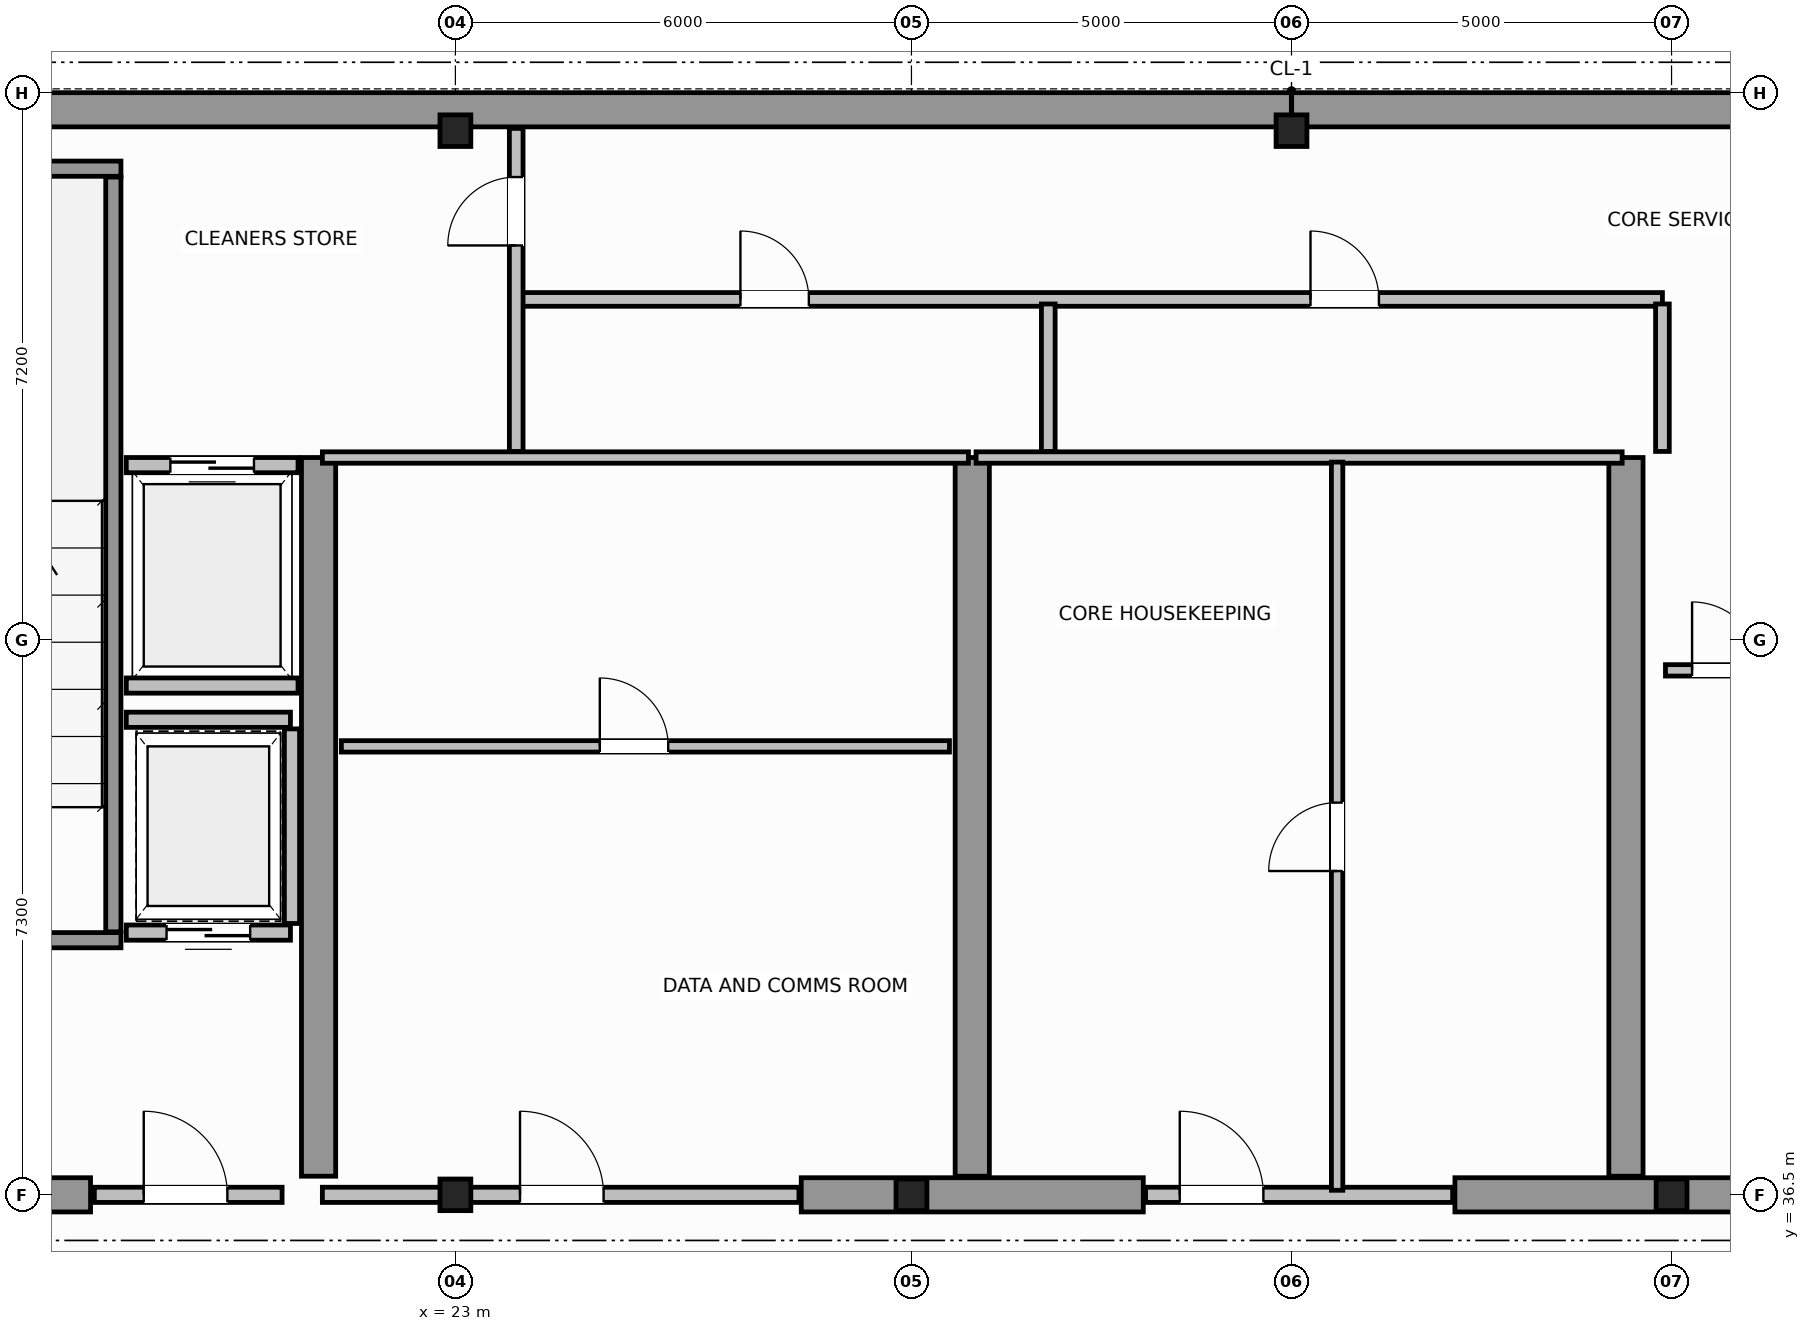
"""IFC4 building model, lengths in metres.
Left out: names, types, materials, properties, quantities, classifications, styles, units other than length and angle.
Written with IfcOpenShell. Run it as: python <this file> out.ifc"""

import sys

from ifc_helpers import new_model, si_unit, direction, frame, frame_2d, origin, origin_2d, place, context, subcontext, project, spatial, rectangle, i_section, extrude, source, transform, mapped, element, fill, save


model = new_model("IFC4")
c1 = context("Model", 3, precision=1e-05, world=origin(), true_north=direction((0.0, 1.0)))
c2 = subcontext(c1, "Body", "Model", "MODEL_VIEW")
j1 = project(units=[si_unit("LENGTHUNIT", "METRE"), si_unit("PLANEANGLEUNIT", "RADIAN")], contexts=[c1])
p1 = place(None, origin())
s1 = spatial("IfcSite", under=j1, at=p1, CompositionType="ELEMENT")
p2 = place(p1, origin())
s2 = spatial("IfcBuilding", under=s1, at=p2, CompositionType="ELEMENT")
p3 = place(p2, frame((0.0, 0.0, 308.4)))
s3 = spatial("IfcBuildingStorey", under=s2, at=p3, CompositionType="ELEMENT", Elevation=308.4)
m1 = source(origin(), c2, "Body", "SweptSolid", [
    extrude(i_section(OverallWidth=0.406, OverallDepth=0.416, WebThickness=0.03, FlangeThickness=0.042, FilletRadius=0.015, at=origin_2d()), origin(), (0.0, 0.0, 1.0), 4.4),
])
for number, where, z_axis, x_axis in (
    (1, (23.0, 36.5, 0.0), (0.0, 0.0, 1.0), (1.0, 0.0, 0.0)),
    (2, (29.0, 36.5, 0.0), (0.0, 0.0, 1.0), (1.0, 0.0, 0.0)),
    (3, (39.0, 36.5, 0.0), (0.0, 0.0, 1.0), (1.0, 0.0, 0.0)),
    (4, (23.0, 50.5, 0.0), (0.0, 0.0, 1.0), (1.0, 0.0, 0.0)),
    (5, (34.0, 50.5, 0.0), (0.0, 0.0, 1.0), (1.0, 0.0, 0.0)),
):
    element("IfcColumn", number, at=place(p3, frame(where, z_axis=z_axis, x_axis=x_axis)), inside=s3, PredefinedType="COLUMN", context=c2, shape_type="MappedRepresentation", body=[
        mapped(m1, transform((0.0, 0.0, 0.0), scale=1.0)),
    ])
for number, where, z_axis, x_axis in (
    (6, (14.229, 50.775, 0.0), (0.0, 0.0, 1.0), (1.0, 0.0, 0.0)),
    (7, (34.002, 50.775, 0.0), (0.0, 0.0, 1.0), (1.0, 0.0, 0.0)),
):
    element("IfcWall", number, at=place(p3, frame(where, z_axis=z_axis, x_axis=x_axis)), inside=s3, PredefinedType="SHEAR", context=c2, shape_type="SweptSolid", body=[
        extrude(rectangle(XDim=19.769, YDim=0.45, at=frame_2d((9.885, 0.0))), origin(), (0.0, 0.0, 1.0), 4.4),
    ])
p4 = place(p3, frame((14.245, 36.5, 0.0), z_axis=(0.0, 0.0, 1.0), x_axis=(1.0, 0.0, 0.0)))
e8 = element("IfcWall", 8, at=p4, inside=s3, PredefinedType="SHEAR", context=c2, shape_type="SweptSolid", body=[
    extrude(rectangle(XDim=3.955, YDim=0.45, at=frame_2d((1.978, 0.0))), origin(), (0.0, 0.0, 1.0), 3.1),
])
for number, where, z_axis, x_axis in (
    (9, (27.55, 36.5, 0.0), (0.0, 0.0, 1.0), (1.0, 0.0, 0.0)),
    (10, (36.15, 36.5, 0.0), (0.0, 0.0, 1.0), (1.0, 0.0, 0.0)),
):
    element("IfcWall", number, at=place(p3, frame(where, z_axis=z_axis, x_axis=x_axis)), inside=s3, PredefinedType="SHEAR", context=c2, shape_type="SweptSolid", body=[
        extrude(rectangle(XDim=4.5, YDim=0.45, at=frame_2d((2.25, 0.0))), origin(), (0.0, 0.0, 1.0), 4.4),
    ])
for number, where, z_axis, x_axis in (
    (11, (21.2, 36.745, 0.0), (0.0, 0.0, 1.0), (0.0, 1.0, 0.0)),
    (12, (29.8, 36.745, 0.0), (0.0, 0.0, 1.0), (0.0, 1.0, 0.0)),
    (13, (38.4, 36.745, 0.0), (0.0, 0.0, 1.0), (0.0, 1.0, 0.0)),
):
    element("IfcWall", number, at=place(p3, frame(where, z_axis=z_axis, x_axis=x_axis)), inside=s3, PredefinedType="SHEAR", context=c2, shape_type="SweptSolid", body=[
        extrude(rectangle(XDim=9.455, YDim=0.45, at=frame_2d((4.728, 0.0))), origin(), (0.0, 0.0, 1.0), 4.4),
    ])
p5 = place(p3, frame((14.225, 39.85, 0.0), z_axis=(0.0, 0.0, 1.0), x_axis=(1.0, 0.0, 0.0)))
e14 = element("IfcWall", 14, at=p5, inside=s3, PredefinedType="SOLIDWALL", context=c2, shape_type="SweptSolid", body=[
    extrude(rectangle(XDim=4.375, YDim=0.2, at=frame_2d((2.188, 0.0))), origin(), (0.0, 0.0, 1.0), 4.4),
])
p6 = place(p5, frame((1.95, 0.0, 0.0)))
e15 = element("IfcOpeningElement", 15, at=p6, cuts=e14, PredefinedType="OPENING", context=c2, shape_type="SweptSolid", body=[
    extrude(rectangle(XDim=1.1, YDim=2.15, at=frame_2d((0.55, 1.075))), frame((0.0, 0.11, 0.0), z_axis=(0.0, -1.0, 0.0), x_axis=(1.0, 0.0, 0.0)), (0.0, 0.0, 1.0), 0.22),
])
p7 = place(p3, frame((14.225, 50.0, 0.0), z_axis=(0.0, 0.0, 1.0), x_axis=(1.0, 0.0, 0.0)))
e16 = element("IfcWall", 16, at=p7, inside=s3, PredefinedType="SOLIDWALL", context=c2, shape_type="SweptSolid", body=[
    extrude(rectangle(XDim=4.375, YDim=0.2, at=frame_2d((2.188, 0.0))), origin(), (0.0, 0.0, 1.0), 4.4),
])
p8 = place(p3, frame((18.5, 39.96, 0.0), z_axis=(0.0, 0.0, 1.0), x_axis=(0.0, 1.0, 0.0)))
e17 = element("IfcWall", 17, at=p8, inside=s3, PredefinedType="SOLIDWALL", context=c2, shape_type="SweptSolid", body=[
    extrude(rectangle(XDim=9.93, YDim=0.2, at=frame_2d((4.965, 0.0))), origin(), (0.0, 0.0, 1.0), 4.4),
])
p9 = place(p3, frame((18.25, 36.5, 0.0), z_axis=(0.0, 0.0, 1.0), x_axis=(1.0, 0.0, 0.0)))
e18 = element("IfcWall", 18, at=p9, inside=s3, PredefinedType="SOLIDWALL", context=c2, shape_type="SweptSolid", body=[
    extrude(rectangle(XDim=2.47, YDim=0.2, at=frame_2d((1.235, 0.0))), origin(), (0.0, 0.0, 1.0), 3.09),
])
p10 = place(p9, frame((0.65, 0.0, 0.0)))
e19 = element("IfcOpeningElement", 19, at=p10, cuts=e18, PredefinedType="OPENING", context=c2, shape_type="SweptSolid", body=[
    extrude(rectangle(XDim=1.1, YDim=2.15, at=frame_2d((0.55, 1.075))), frame((0.0, 0.11, 0.0), z_axis=(0.0, -1.0, 0.0), x_axis=(1.0, 0.0, 0.0)), (0.0, 0.0, 1.0), 0.22),
])
p11 = place(p3, frame((18.67, 46.1, 0.0), z_axis=(0.0, 0.0, 1.0), x_axis=(1.0, 0.0, 0.0)))
e20 = element("IfcWall", 20, at=p11, inside=s3, PredefinedType="SOLIDWALL", context=c2, shape_type="SweptSolid", body=[
    extrude(rectangle(XDim=2.26, YDim=0.2, at=frame_2d((1.13, 0.0))), origin(), (0.0, 0.0, 1.0), 4.1),
])
p12 = place(p11, frame((0.58, 0.0, 0.0)))
e21 = element("IfcOpeningElement", 21, at=p12, cuts=e20, PredefinedType="OPENING", context=c2, shape_type="SweptSolid", body=[
    extrude(rectangle(XDim=1.1, YDim=2.15, at=frame_2d((0.55, 1.075))), frame((0.0, 0.11, 0.0), z_axis=(0.0, -1.0, 0.0), x_axis=(1.0, 0.0, 0.0)), (0.0, 0.0, 1.0), 0.22),
])
p13 = place(p3, frame((18.67, 43.2, 0.0), z_axis=(0.0, 0.0, 1.0), x_axis=(1.0, 0.0, 0.0)))
e22 = element("IfcWall", 22, at=p13, inside=s3, PredefinedType="SOLIDWALL", context=c2, shape_type="SweptSolid", body=[
    extrude(rectangle(XDim=2.26, YDim=0.2, at=frame_2d((1.13, 0.0))), origin(), (0.0, 0.0, 1.0), 4.1),
])
p14 = place(p3, frame((18.67, 39.95, 0.0), z_axis=(0.0, 0.0, 1.0), x_axis=(1.0, 0.0, 0.0)))
e23 = element("IfcWall", 23, at=p14, inside=s3, PredefinedType="SOLIDWALL", context=c2, shape_type="SweptSolid", body=[
    extrude(rectangle(XDim=2.16, YDim=0.2, at=frame_2d((1.08, 0.0))), origin(), (0.0, 0.0, 1.0), 4.1),
])
p15 = place(p14, frame((0.53, 0.0, 0.0)))
e24 = element("IfcOpeningElement", 24, at=p15, cuts=e23, PredefinedType="OPENING", context=c2, shape_type="SweptSolid", body=[
    extrude(rectangle(XDim=1.1, YDim=2.15, at=frame_2d((0.55, 1.075))), frame((0.0, 0.11, 0.0), z_axis=(0.0, -1.0, 0.0), x_axis=(1.0, 0.0, 0.0)), (0.0, 0.0, 1.0), 0.22),
])
p16 = place(p3, frame((18.67, 42.75, 0.0), z_axis=(0.0, 0.0, 1.0), x_axis=(1.0, 0.0, 0.0)))
e25 = element("IfcWall", 25, at=p16, inside=s3, PredefinedType="SOLIDWALL", context=c2, shape_type="SweptSolid", body=[
    extrude(rectangle(XDim=2.16, YDim=0.2, at=frame_2d((1.08, 0.0))), origin(), (0.0, 0.0, 1.0), 4.1),
])
p17 = place(p3, frame((20.85, 40.07, 0.0), z_axis=(0.0, 0.0, 1.0), x_axis=(0.0, 1.0, 0.0)))
e26 = element("IfcWall", 26, at=p17, inside=s3, PredefinedType="SOLIDWALL", context=c2, shape_type="SweptSolid", body=[
    extrude(rectangle(XDim=2.56, YDim=0.2, at=frame_2d((1.28, 0.0))), origin(), (0.0, 0.0, 1.0), 4.1),
])
p18 = place(p3, frame((21.25, 36.5, 0.0), z_axis=(0.0, 0.0, 1.0), x_axis=(1.0, 0.0, 0.0)))
e27 = element("IfcWall", 27, at=p18, inside=s3, PredefinedType="SOLIDWALL", context=c2, shape_type="SweptSolid", body=[
    extrude(rectangle(XDim=6.27, YDim=0.2, at=frame_2d((3.135, 0.0))), origin(), (0.0, 0.0, 1.0), 2.89),
])
p19 = place(p18, frame((2.6, 0.0, 0.0)))
e28 = element("IfcOpeningElement", 28, at=p19, cuts=e27, PredefinedType="OPENING", context=c2, shape_type="SweptSolid", body=[
    extrude(rectangle(XDim=1.1, YDim=2.15, at=frame_2d((0.55, 1.075))), frame((0.0, 0.11, 0.0), z_axis=(0.0, -1.0, 0.0), x_axis=(1.0, 0.0, 0.0)), (0.0, 0.0, 1.0), 0.22),
])
p20 = place(p3, frame((21.25, 46.2, 0.0), z_axis=(0.0, 0.0, 1.0), x_axis=(1.0, 0.0, 0.0)))
e29 = element("IfcWall", 29, at=p20, inside=s3, PredefinedType="PARTITIONING", context=c2, shape_type="SweptSolid", body=[
    extrude(rectangle(XDim=8.5, YDim=0.15, at=frame_2d((4.25, 0.0))), origin(), (0.0, 0.0, 1.0), 4.1),
])
p21 = place(p3, frame((21.5, 42.4, 0.0), z_axis=(0.0, 0.0, 1.0), x_axis=(1.0, 0.0, 0.0)))
e30 = element("IfcWall", 30, at=p21, inside=s3, PredefinedType="PARTITIONING", context=c2, shape_type="SweptSolid", body=[
    extrude(rectangle(XDim=8.0, YDim=0.15, at=frame_2d((4.0, 0.0))), origin(), (0.0, 0.0, 1.0), 4.1),
])
p22 = place(p21, frame((3.4, 0.0, 0.0)))
e31 = element("IfcOpeningElement", 31, at=p22, cuts=e30, PredefinedType="OPENING", context=c2, shape_type="SweptSolid", body=[
    extrude(rectangle(XDim=0.9, YDim=2.1, at=frame_2d((0.45, 1.05))), frame((0.0, 0.085, 0.0), z_axis=(0.0, -1.0, 0.0), x_axis=(1.0, 0.0, 0.0)), (0.0, 0.0, 1.0), 0.17),
])
p23 = place(p3, frame((32.08, 36.5, 0.0), z_axis=(0.0, 0.0, 1.0), x_axis=(1.0, 0.0, 0.0)))
e32 = element("IfcWall", 32, at=p23, inside=s3, PredefinedType="SOLIDWALL", context=c2, shape_type="SweptSolid", body=[
    extrude(rectangle(XDim=4.04, YDim=0.2, at=frame_2d((2.02, 0.0))), origin(), (0.0, 0.0, 1.0), 2.89),
])
p24 = place(p23, frame((0.45, 0.0, 0.0)))
e33 = element("IfcOpeningElement", 33, at=p24, cuts=e32, PredefinedType="OPENING", context=c2, shape_type="SweptSolid", body=[
    extrude(rectangle(XDim=1.1, YDim=2.15, at=frame_2d((0.55, 1.075))), frame((0.0, 0.11, 0.0), z_axis=(0.0, -1.0, 0.0), x_axis=(1.0, 0.0, 0.0)), (0.0, 0.0, 1.0), 0.22),
])
p25 = place(p3, frame((29.85, 46.2, 0.0), z_axis=(0.0, 0.0, 1.0), x_axis=(1.0, 0.0, 0.0)))
e34 = element("IfcWall", 34, at=p25, inside=s3, PredefinedType="PARTITIONING", context=c2, shape_type="SweptSolid", body=[
    extrude(rectangle(XDim=8.5, YDim=0.15, at=frame_2d((4.25, 0.0))), origin(), (0.0, 0.0, 1.0), 4.1),
])
p26 = place(p3, frame((34.6, 36.56, 0.0), z_axis=(0.0, 0.0, 1.0), x_axis=(0.0, 1.0, 0.0)))
e35 = element("IfcWall", 35, at=p26, inside=s3, PredefinedType="PARTITIONING", context=c2, shape_type="SweptSolid", body=[
    extrude(rectangle(XDim=9.58, YDim=0.15, at=frame_2d((4.79, 0.0))), origin(), (0.0, 0.0, 1.0), 4.1),
])
p27 = place(p26, frame((4.2, 0.0, 0.0)))
e36 = element("IfcOpeningElement", 36, at=p27, cuts=e35, PredefinedType="OPENING", context=c2, shape_type="SweptSolid", body=[
    extrude(rectangle(XDim=0.9, YDim=2.1, at=frame_2d((0.45, 1.05))), frame((0.0, 0.085, 0.0), z_axis=(0.0, -1.0, 0.0), x_axis=(1.0, 0.0, 0.0)), (0.0, 0.0, 1.0), 0.17),
])
p28 = place(p3, frame((38.92, 43.4, 0.0), z_axis=(0.0, 0.0, 1.0), x_axis=(1.0, 0.0, 0.0)))
e37 = element("IfcWall", 37, at=p28, inside=s3, PredefinedType="PARTITIONING", context=c2, shape_type="SweptSolid", body=[
    extrude(rectangle(XDim=1.6, YDim=0.15, at=frame_2d((0.8, 0.0))), origin(), (0.0, 0.0, 1.0), 4.1),
])
p29 = place(p28, frame((0.35, 0.0, 0.0)))
e38 = element("IfcOpeningElement", 38, at=p29, cuts=e37, PredefinedType="OPENING", context=c2, shape_type="SweptSolid", body=[
    extrude(rectangle(XDim=0.9, YDim=2.1, at=frame_2d((0.45, 1.05))), frame((0.0, 0.085, 0.0), z_axis=(0.0, -1.0, 0.0), x_axis=(1.0, 0.0, 0.0)), (0.0, 0.0, 1.0), 0.17),
])
p30 = place(p3, frame((23.85, 48.28, 0.0), z_axis=(0.0, 0.0, 1.0), x_axis=(1.0, 0.0, 0.0)))
e39 = element("IfcWall", 39, at=p30, inside=s3, PredefinedType="PLUMBINGWALL", context=c2, shape_type="SweptSolid", body=[
    extrude(rectangle(XDim=15.03, YDim=0.18, at=frame_2d((7.515, 0.0))), origin(), (0.0, 0.0, 1.0), 4.1),
])
p31 = place(p30, frame((2.9, 0.0, 0.0)))
e40 = element("IfcOpeningElement", 40, at=p31, cuts=e39, PredefinedType="OPENING", context=c2, shape_type="SweptSolid", body=[
    extrude(rectangle(XDim=0.9, YDim=2.15, at=frame_2d((0.45, 1.075))), frame((0.0, 0.1, 0.0), z_axis=(0.0, -1.0, 0.0), x_axis=(1.0, 0.0, 0.0)), (0.0, 0.0, 1.0), 0.2),
])
p32 = place(p30, frame((10.4, 0.0, 0.0)))
e41 = element("IfcOpeningElement", 41, at=p32, cuts=e39, PredefinedType="OPENING", context=c2, shape_type="SweptSolid", body=[
    extrude(rectangle(XDim=0.9, YDim=2.15, at=frame_2d((0.45, 1.075))), frame((0.0, 0.1, 0.0), z_axis=(0.0, -1.0, 0.0), x_axis=(1.0, 0.0, 0.0)), (0.0, 0.0, 1.0), 0.2),
])
p33 = place(p3, frame((23.8, 46.28, 0.0), z_axis=(0.0, 0.0, 1.0), x_axis=(0.0, 1.0, 0.0)))
e42 = element("IfcWall", 42, at=p33, inside=s3, PredefinedType="PLUMBINGWALL", context=c2, shape_type="SweptSolid", body=[
    extrude(rectangle(XDim=4.25, YDim=0.18, at=frame_2d((2.125, 0.0))), origin(), (0.0, 0.0, 1.0), 4.1),
])
p34 = place(p33, frame((2.71, 0.0, 0.0)))
e43 = element("IfcOpeningElement", 43, at=p34, cuts=e42, PredefinedType="OPENING", context=c2, shape_type="SweptSolid", body=[
    extrude(rectangle(XDim=0.9, YDim=2.15, at=frame_2d((0.45, 1.075))), frame((0.0, 0.1, 0.0), z_axis=(0.0, -1.0, 0.0), x_axis=(1.0, 0.0, 0.0)), (0.0, 0.0, 1.0), 0.2),
])
for number, where, z_axis, x_axis in (
    (44, (30.8, 46.28, 0.0), (0.0, 0.0, 1.0), (0.0, 1.0, 0.0)),
    (45, (38.88, 46.28, 0.0), (0.0, 0.0, 1.0), (0.0, 1.0, 0.0)),
):
    element("IfcWall", number, at=place(p3, frame(where, z_axis=z_axis, x_axis=x_axis)), inside=s3, PredefinedType="PLUMBINGWALL", context=c2, shape_type="SweptSolid", body=[
        extrude(rectangle(XDim=1.94, YDim=0.18, at=frame_2d((0.97, 0.0))), origin(), (0.0, 0.0, 1.0), 4.1),
    ])
m2 = source(origin(), c2, "Body", "SweptSolid", [
    extrude(rectangle(XDim=1.1, YDim=2.15, at=frame_2d((0.55, 1.075))), frame((0.0, 0.025, 0.0), z_axis=(0.0, -1.0, 0.0), x_axis=(1.0, 0.0, 0.0)), (0.0, 0.0, 1.0), 0.05),
])
p35 = place(p10, origin())
e46 = element("IfcDoor", 46, at=p35, inside=s3, OperationType="SINGLE_SWING_RIGHT", PredefinedType="DOOR", context=c2, shape_type="MappedRepresentation", body=[
    mapped(m2, transform((0.0, 0.0, 0.0), scale=1.0)),
])
fill(e19, e46)
p36 = place(p12, origin())
e47 = element("IfcDoor", 47, at=p36, inside=s3, OperationType="DOUBLE_DOOR_SLIDING", PredefinedType="DOOR", context=c2, shape_type="MappedRepresentation", body=[
    mapped(m2, transform((0.0, 0.0, 0.0), scale=1.0)),
])
fill(e21, e47)
p37 = place(p15, origin())
e48 = element("IfcDoor", 48, at=p37, inside=s3, OperationType="DOUBLE_DOOR_SLIDING", PredefinedType="DOOR", context=c2, shape_type="MappedRepresentation", body=[
    mapped(m2, transform((0.0, 0.0, 0.0), scale=1.0)),
])
fill(e24, e48)
p38 = place(p19, origin())
e49 = element("IfcDoor", 49, at=p38, inside=s3, OperationType="SINGLE_SWING_LEFT", PredefinedType="DOOR", context=c2, shape_type="MappedRepresentation", body=[
    mapped(m2, transform((0.0, 0.0, 0.0), scale=1.0)),
])
fill(e28, e49)
m3 = source(origin(), c2, "Body", "SweptSolid", [
    extrude(rectangle(XDim=0.9, YDim=2.1, at=frame_2d((0.45, 1.05))), frame((0.0, 0.025, 0.0), z_axis=(0.0, -1.0, 0.0), x_axis=(1.0, 0.0, 0.0)), (0.0, 0.0, 1.0), 0.05),
])
p39 = place(p22, origin())
e50 = element("IfcDoor", 50, at=p39, inside=s3, OperationType="SINGLE_SWING_RIGHT", PredefinedType="DOOR", context=c2, shape_type="MappedRepresentation", body=[
    mapped(m3, transform((0.0, 0.0, 0.0), scale=1.0)),
])
fill(e31, e50)
p40 = place(p24, origin())
e51 = element("IfcDoor", 51, at=p40, inside=s3, OperationType="SINGLE_SWING_LEFT", PredefinedType="DOOR", context=c2, shape_type="MappedRepresentation", body=[
    mapped(m2, transform((0.0, 0.0, 0.0), scale=1.0)),
])
fill(e33, e51)
p41 = place(p27, origin())
e52 = element("IfcDoor", 52, at=p41, inside=s3, OperationType="SINGLE_SWING_RIGHT", PredefinedType="DOOR", context=c2, shape_type="MappedRepresentation", body=[
    mapped(m3, transform((0.0, 0.0, 0.0), scale=1.0)),
])
fill(e36, e52)
p42 = place(p29, origin())
e53 = element("IfcDoor", 53, at=p42, inside=s3, OperationType="SINGLE_SWING_LEFT", PredefinedType="DOOR", context=c2, shape_type="MappedRepresentation", body=[
    mapped(m3, transform((0.0, 0.0, 0.0), scale=1.0)),
])
fill(e38, e53)
m4 = source(origin(), c2, "Body", "SweptSolid", [
    extrude(rectangle(XDim=0.9, YDim=2.15, at=frame_2d((0.45, 1.075))), frame((0.0, 0.025, 0.0), z_axis=(0.0, -1.0, 0.0), x_axis=(1.0, 0.0, 0.0)), (0.0, 0.0, 1.0), 0.05),
])
p43 = place(p34, origin())
e54 = element("IfcDoor", 54, at=p43, inside=s3, OperationType="SINGLE_SWING_LEFT", PredefinedType="DOOR", context=c2, shape_type="MappedRepresentation", body=[
    mapped(m4, transform((0.0, 0.0, 0.0), scale=1.0)),
])
fill(e43, e54)
p44 = place(p31, origin())
e55 = element("IfcDoor", 55, at=p44, inside=s3, OperationType="SINGLE_SWING_RIGHT", PredefinedType="DOOR", context=c2, shape_type="MappedRepresentation", body=[
    mapped(m4, transform((0.0, 0.0, 0.0), scale=1.0)),
])
fill(e40, e55)
p45 = place(p32, origin())
e56 = element("IfcDoor", 56, at=p45, inside=s3, OperationType="SINGLE_SWING_LEFT", PredefinedType="DOOR", context=c2, shape_type="MappedRepresentation", body=[
    mapped(m4, transform((0.0, 0.0, 0.0), scale=1.0)),
])
fill(e41, e56)
save(model, sys.argv[1])
